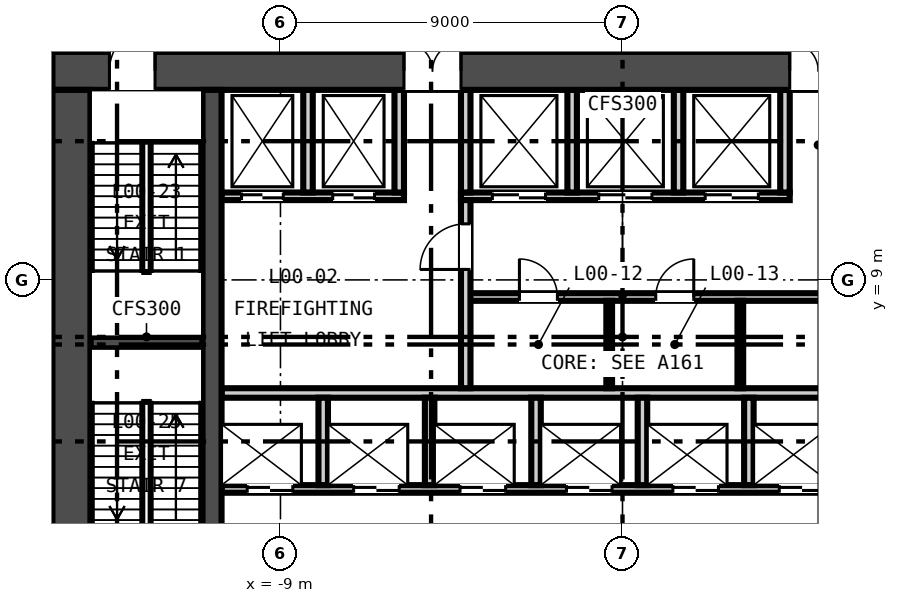
"""IFC4 building model, lengths in metres.
Left out: names, types, materials, properties, quantities, classifications, styles, units other than length and angle.
Written with IfcOpenShell. Run it as: python <this file> out.ifc"""

import sys

from ifc_helpers import new_model, si_unit, direction, frame, frame_2d, origin, place, context, subcontext, project, spatial, rectangle, extrude, element, fill, save


model = new_model("IFC4")
c1 = context("Model", 3, precision=1e-05, world=origin(), true_north=direction((0.0, 1.0)))
c2 = subcontext(c1, "Body", "Model", "MODEL_VIEW")
j1 = project(units=[si_unit("LENGTHUNIT", "METRE"), si_unit("PLANEANGLEUNIT", "RADIAN")], contexts=[c1])
p1 = place(None, origin())
s1 = spatial("IfcSite", under=j1, at=p1, CompositionType="ELEMENT")
p2 = place(p1, origin())
s2 = spatial("IfcBuilding", under=s1, at=p2, CompositionType="ELEMENT")
p3 = place(p2, origin())
s3 = spatial("IfcBuildingStorey", under=s2, at=p3, CompositionType="ELEMENT", Elevation=0.0)
p4 = place(p3, frame((-15.0, 14.5, -2.2), z_axis=(0.0, 0.0, 1.0), x_axis=(1.0, 0.0, 0.0)))
e1 = element("IfcWall", 1, at=p4, inside=s3, PredefinedType="SOLIDWALL", context=c2, shape_type="SweptSolid", body=[
    extrude(rectangle(XDim=30.0, YDim=1.0, at=frame_2d((15.0, 0.0))), origin(), (0.0, 0.0, 1.0), 10.8),
])
p5 = place(p4, frame((9.25, 0.0, 2.2)))
e2 = element("IfcOpeningElement", 2, at=p5, cuts=e1, PredefinedType="OPENING", context=c2, shape_type="SweptSolid", body=[
    extrude(rectangle(XDim=1.5, YDim=2.1, at=frame_2d((0.75, 1.05))), frame((0.0, 0.51, 0.0), z_axis=(0.0, -1.0, 0.0), x_axis=(1.0, 0.0, 0.0)), (0.0, 0.0, 1.0), 1.02),
])
p6 = place(p4, frame((19.4, 0.0, 2.2)))
e3 = element("IfcOpeningElement", 3, at=p6, cuts=e1, PredefinedType="OPENING", context=c2, shape_type="SweptSolid", body=[
    extrude(rectangle(XDim=1.5, YDim=2.1, at=frame_2d((0.75, 1.05))), frame((0.0, 0.51, 0.0), z_axis=(0.0, -1.0, 0.0), x_axis=(1.0, 0.0, 0.0)), (0.0, 0.0, 1.0), 1.02),
])
p7 = place(p4, frame((1.5, 0.0, 2.2)))
e4 = element("IfcOpeningElement", 4, at=p7, cuts=e1, PredefinedType="OPENING", context=c2, shape_type="SweptSolid", body=[
    extrude(rectangle(XDim=1.2, YDim=2.1, at=frame_2d((0.6, 1.05))), frame((0.0, 0.51, 0.0), z_axis=(0.0, -1.0, 0.0), x_axis=(1.0, 0.0, 0.0)), (0.0, 0.0, 1.0), 1.02),
])
p8 = place(p4, frame((27.3, 0.0, 2.2)))
e5 = element("IfcOpeningElement", 5, at=p8, cuts=e1, PredefinedType="OPENING", context=c2, shape_type="SweptSolid", body=[
    extrude(rectangle(XDim=1.2, YDim=2.1, at=frame_2d((0.6, 1.05))), frame((0.0, 0.51, 0.0), z_axis=(0.0, -1.0, 0.0), x_axis=(1.0, 0.0, 0.0)), (0.0, 0.0, 1.0), 1.02),
])
p9 = place(p3, frame((-14.5, 1.0, -2.2), z_axis=(0.0, 0.0, 1.0), x_axis=(0.0, 1.0, 0.0)))
e6 = element("IfcWall", 6, at=p9, inside=s3, PredefinedType="SOLIDWALL", context=c2, shape_type="SweptSolid", body=[
    extrude(rectangle(XDim=13.0, YDim=1.0, at=frame_2d((6.5, 0.0))), origin(), (0.0, 0.0, 1.0), 10.8),
])
p10 = place(p3, frame((-10.8, 1.0, -2.2), z_axis=(0.0, 0.0, 1.0), x_axis=(0.0, 1.0, 0.0)))
e7 = element("IfcWall", 7, at=p10, inside=s3, PredefinedType="SOLIDWALL", context=c2, shape_type="SweptSolid", body=[
    extrude(rectangle(XDim=13.0, YDim=0.5, at=frame_2d((6.5, 0.0))), origin(), (0.0, 0.0, 1.0), 10.8),
])
p11 = place(p3, frame((-10.55, 3.5, 0.0), z_axis=(0.0, 0.0, 1.0), x_axis=(1.0, 0.0, 0.0)))
e8 = element("IfcWall", 8, at=p11, inside=s3, PredefinedType="PARTITIONING", context=c2, shape_type="SweptSolid", body=[
    extrude(rectangle(XDim=21.1, YDim=0.2, at=frame_2d((10.55, 0.0))), origin(), (0.0, 0.0, 1.0), 8.6),
])
p12 = place(p11, frame((0.675, 0.0, 0.0)))
e9 = element("IfcOpeningElement", 9, at=p12, cuts=e8, PredefinedType="OPENING", context=c2, shape_type="SweptSolid", body=[
    extrude(rectangle(XDim=1.2, YDim=2.1, at=frame_2d((0.6, 1.05))), frame((0.0, 0.11, 0.0), z_axis=(0.0, -1.0, 0.0), x_axis=(1.0, 0.0, 0.0)), (0.0, 0.0, 1.0), 0.22),
])
p13 = place(p11, frame((3.475, 0.0, 0.0)))
e10 = element("IfcOpeningElement", 10, at=p13, cuts=e8, PredefinedType="OPENING", context=c2, shape_type="SweptSolid", body=[
    extrude(rectangle(XDim=1.2, YDim=2.1, at=frame_2d((0.6, 1.05))), frame((0.0, 0.11, 0.0), z_axis=(0.0, -1.0, 0.0), x_axis=(1.0, 0.0, 0.0)), (0.0, 0.0, 1.0), 0.22),
])
p14 = place(p11, frame((6.275, 0.0, 0.0)))
e11 = element("IfcOpeningElement", 11, at=p14, cuts=e8, PredefinedType="OPENING", context=c2, shape_type="SweptSolid", body=[
    extrude(rectangle(XDim=1.2, YDim=2.1, at=frame_2d((0.6, 1.05))), frame((0.0, 0.11, 0.0), z_axis=(0.0, -1.0, 0.0), x_axis=(1.0, 0.0, 0.0)), (0.0, 0.0, 1.0), 0.22),
])
p15 = place(p11, frame((9.075, 0.0, 0.0)))
e12 = element("IfcOpeningElement", 12, at=p15, cuts=e8, PredefinedType="OPENING", context=c2, shape_type="SweptSolid", body=[
    extrude(rectangle(XDim=1.2, YDim=2.1, at=frame_2d((0.6, 1.05))), frame((0.0, 0.11, 0.0), z_axis=(0.0, -1.0, 0.0), x_axis=(1.0, 0.0, 0.0)), (0.0, 0.0, 1.0), 0.22),
])
p16 = place(p11, frame((11.875, 0.0, 0.0)))
e13 = element("IfcOpeningElement", 13, at=p16, cuts=e8, PredefinedType="OPENING", context=c2, shape_type="SweptSolid", body=[
    extrude(rectangle(XDim=1.2, YDim=2.1, at=frame_2d((0.6, 1.05))), frame((0.0, 0.11, 0.0), z_axis=(0.0, -1.0, 0.0), x_axis=(1.0, 0.0, 0.0)), (0.0, 0.0, 1.0), 0.22),
])
p17 = place(p11, frame((14.675, 0.0, 0.0)))
e14 = element("IfcOpeningElement", 14, at=p17, cuts=e8, PredefinedType="OPENING", context=c2, shape_type="SweptSolid", body=[
    extrude(rectangle(XDim=1.2, YDim=2.1, at=frame_2d((0.6, 1.05))), frame((0.0, 0.11, 0.0), z_axis=(0.0, -1.0, 0.0), x_axis=(1.0, 0.0, 0.0)), (0.0, 0.0, 1.0), 0.22),
])
p18 = place(p11, frame((17.475, 0.0, 0.0)))
e15 = element("IfcOpeningElement", 15, at=p18, cuts=e8, PredefinedType="OPENING", context=c2, shape_type="SweptSolid", body=[
    extrude(rectangle(XDim=1.2, YDim=2.1, at=frame_2d((0.6, 1.05))), frame((0.0, 0.11, 0.0), z_axis=(0.0, -1.0, 0.0), x_axis=(1.0, 0.0, 0.0)), (0.0, 0.0, 1.0), 0.22),
])
p19 = place(p11, frame((19.9, 0.0, 0.0)))
e16 = element("IfcOpeningElement", 16, at=p19, cuts=e8, PredefinedType="OPENING", context=c2, shape_type="SweptSolid", body=[
    extrude(rectangle(XDim=0.9, YDim=2.1, at=frame_2d((0.45, 1.05))), frame((0.0, 0.11, 0.0), z_axis=(0.0, -1.0, 0.0), x_axis=(1.0, 0.0, 0.0)), (0.0, 0.0, 1.0), 0.22),
])
p20 = place(p3, frame((-10.55, 6.025, 0.0), z_axis=(0.0, 0.0, 1.0), x_axis=(1.0, 0.0, 0.0)))
e17 = element("IfcWall", 17, at=p20, inside=s3, PredefinedType="PARTITIONING", context=c2, shape_type="SweptSolid", body=[
    extrude(rectangle(XDim=21.1, YDim=0.25, at=frame_2d((10.55, 0.0))), origin(), (0.0, 0.0, 1.0), 8.6),
])
p21 = place(p3, frame((-4.125, 8.55, 0.0), z_axis=(0.0, 0.0, 1.0), x_axis=(1.0, 0.0, 0.0)))
e18 = element("IfcWall", 18, at=p21, inside=s3, PredefinedType="PARTITIONING", context=c2, shape_type="SweptSolid", body=[
    extrude(rectangle(XDim=14.675, YDim=0.2, at=frame_2d((7.337, 0.0))), origin(), (0.0, 0.0, 1.0), 8.6),
])
p22 = place(p21, frame((1.413, 0.0, 0.0)))
e19 = element("IfcOpeningElement", 19, at=p22, cuts=e18, PredefinedType="OPENING", context=c2, shape_type="SweptSolid", body=[
    extrude(rectangle(XDim=1.0, YDim=2.1, at=frame_2d((0.5, 1.05))), frame((0.0, 0.11, 0.0), z_axis=(0.0, -1.0, 0.0), x_axis=(1.0, 0.0, 0.0)), (0.0, 0.0, 1.0), 0.22),
])
p23 = place(p21, frame((5.0, 0.0, 0.0)))
e20 = element("IfcOpeningElement", 20, at=p23, cuts=e18, PredefinedType="OPENING", context=c2, shape_type="SweptSolid", body=[
    extrude(rectangle(XDim=1.0, YDim=2.1, at=frame_2d((0.5, 1.05))), frame((0.0, 0.11, 0.0), z_axis=(0.0, -1.0, 0.0), x_axis=(1.0, 0.0, 0.0)), (0.0, 0.0, 1.0), 0.22),
])
p24 = place(p21, frame((9.613, 0.0, 0.0)))
e21 = element("IfcOpeningElement", 21, at=p24, cuts=e18, PredefinedType="OPENING", context=c2, shape_type="SweptSolid", body=[
    extrude(rectangle(XDim=1.0, YDim=2.1, at=frame_2d((0.5, 1.05))), frame((0.0, 0.11, 0.0), z_axis=(0.0, -1.0, 0.0), x_axis=(1.0, 0.0, 0.0)), (0.0, 0.0, 1.0), 0.22),
])
p25 = place(p21, frame((13.475, 0.0, 0.0)))
e22 = element("IfcOpeningElement", 22, at=p25, cuts=e18, PredefinedType="OPENING", context=c2, shape_type="SweptSolid", body=[
    extrude(rectangle(XDim=0.9, YDim=2.1, at=frame_2d((0.45, 1.05))), frame((0.0, 0.11, 0.0), z_axis=(0.0, -1.0, 0.0), x_axis=(1.0, 0.0, 0.0)), (0.0, 0.0, 1.0), 0.22),
])
p26 = place(p3, frame((-10.55, 11.2, 0.0), z_axis=(0.0, 0.0, 1.0), x_axis=(1.0, 0.0, 0.0)))
e23 = element("IfcWall", 23, at=p26, inside=s3, PredefinedType="PARTITIONING", context=c2, shape_type="SweptSolid", body=[
    extrude(rectangle(XDim=4.8, YDim=0.2, at=frame_2d((2.4, 0.0))), origin(), (0.0, 0.0, 1.0), 8.6),
])
p27 = place(p26, frame((0.525, 0.0, 0.0)))
e24 = element("IfcOpeningElement", 24, at=p27, cuts=e23, PredefinedType="OPENING", context=c2, shape_type="SweptSolid", body=[
    extrude(rectangle(XDim=1.1, YDim=2.1, at=frame_2d((0.55, 1.05))), frame((0.0, 0.11, 0.0), z_axis=(0.0, -1.0, 0.0), x_axis=(1.0, 0.0, 0.0)), (0.0, 0.0, 1.0), 0.22),
])
p28 = place(p26, frame((2.925, 0.0, 0.0)))
e25 = element("IfcOpeningElement", 25, at=p28, cuts=e23, PredefinedType="OPENING", context=c2, shape_type="SweptSolid", body=[
    extrude(rectangle(XDim=1.1, YDim=2.1, at=frame_2d((0.55, 1.05))), frame((0.0, 0.11, 0.0), z_axis=(0.0, -1.0, 0.0), x_axis=(1.0, 0.0, 0.0)), (0.0, 0.0, 1.0), 0.22),
])
p29 = place(p3, frame((-4.25, 11.2, 0.0), z_axis=(0.0, 0.0, 1.0), x_axis=(1.0, 0.0, 0.0)))
e26 = element("IfcWall", 26, at=p29, inside=s3, PredefinedType="PARTITIONING", context=c2, shape_type="SweptSolid", body=[
    extrude(rectangle(XDim=8.65, YDim=0.2, at=frame_2d((4.325, 0.0))), origin(), (0.0, 0.0, 1.0), 8.6),
])
p30 = place(p29, frame((0.825, 0.0, 0.0)))
e27 = element("IfcOpeningElement", 27, at=p30, cuts=e26, PredefinedType="OPENING", context=c2, shape_type="SweptSolid", body=[
    extrude(rectangle(XDim=1.4, YDim=2.1, at=frame_2d((0.7, 1.05))), frame((0.0, 0.11, 0.0), z_axis=(0.0, -1.0, 0.0), x_axis=(1.0, 0.0, 0.0)), (0.0, 0.0, 1.0), 0.22),
])
p31 = place(p29, frame((3.625, 0.0, 0.0)))
e28 = element("IfcOpeningElement", 28, at=p31, cuts=e26, PredefinedType="OPENING", context=c2, shape_type="SweptSolid", body=[
    extrude(rectangle(XDim=1.4, YDim=2.1, at=frame_2d((0.7, 1.05))), frame((0.0, 0.11, 0.0), z_axis=(0.0, -1.0, 0.0), x_axis=(1.0, 0.0, 0.0)), (0.0, 0.0, 1.0), 0.22),
])
p32 = place(p29, frame((6.425, 0.0, 0.0)))
e29 = element("IfcOpeningElement", 29, at=p32, cuts=e26, PredefinedType="OPENING", context=c2, shape_type="SweptSolid", body=[
    extrude(rectangle(XDim=1.4, YDim=2.1, at=frame_2d((0.7, 1.05))), frame((0.0, 0.11, 0.0), z_axis=(0.0, -1.0, 0.0), x_axis=(1.0, 0.0, 0.0)), (0.0, 0.0, 1.0), 0.22),
])
p33 = place(p3, frame((-4.125, 6.15, 0.0), z_axis=(0.0, 0.0, 1.0), x_axis=(0.0, 1.0, 0.0)))
e30 = element("IfcWall", 30, at=p33, inside=s3, PredefinedType="PARTITIONING", context=c2, shape_type="SweptSolid", body=[
    extrude(rectangle(XDim=4.95, YDim=0.25, at=frame_2d((2.475, 0.0))), origin(), (0.0, 0.0, 1.0), 8.6),
])
p34 = place(p33, frame((3.125, 0.0, 0.0)))
e31 = element("IfcOpeningElement", 31, at=p34, cuts=e30, PredefinedType="OPENING", context=c2, shape_type="SweptSolid", body=[
    extrude(rectangle(XDim=1.2, YDim=2.1, at=frame_2d((0.6, 1.05))), frame((0.0, 0.135, 0.0), z_axis=(0.0, -1.0, 0.0), x_axis=(1.0, 0.0, 0.0)), (0.0, 0.0, 1.0), 0.27),
])
for number, where, z_axis, x_axis in (
    (32, (-7.875, 3.6, 0.0), (0.0, 0.0, 1.0), (0.0, 1.0, 0.0)),
    (33, (-5.075, 3.6, 0.0), (0.0, 0.0, 1.0), (0.0, 1.0, 0.0)),
    (34, (-2.275, 3.6, 0.0), (0.0, 0.0, 1.0), (0.0, 1.0, 0.0)),
    (35, (0.525, 3.6, 0.0), (0.0, 0.0, 1.0), (0.0, 1.0, 0.0)),
    (36, (3.325, 3.6, 0.0), (0.0, 0.0, 1.0), (0.0, 1.0, 0.0)),
):
    element("IfcWall", number, at=place(p3, frame(where, z_axis=z_axis, x_axis=x_axis)), inside=s3, PredefinedType="PARTITIONING", context=c2, shape_type="SweptSolid", body=[
        extrude(rectangle(XDim=2.3, YDim=0.25, at=frame_2d((1.15, 0.0))), origin(), (0.0, 0.0, 1.0), 8.6),
    ])
for number, where, z_axis, x_axis in (
    (37, (-0.35, 6.15, 0.0), (0.0, 0.0, 1.0), (0.0, 1.0, 0.0)),
    (38, (3.1, 6.15, 0.0), (0.0, 0.0, 1.0), (0.0, 1.0, 0.0)),
):
    element("IfcWall", number, at=place(p3, frame(where, z_axis=z_axis, x_axis=x_axis)), inside=s3, PredefinedType="PARTITIONING", context=c2, shape_type="SweptSolid", body=[
        extrude(rectangle(XDim=2.3, YDim=0.15, at=frame_2d((1.15, 0.0))), origin(), (0.0, 0.0, 1.0), 8.6),
    ])
for number, where, z_axis, x_axis in (
    (39, (-8.275, 11.3, 0.0), (0.0, 0.0, 1.0), (0.0, 1.0, 0.0)),
    (40, (-5.875, 11.3, 0.0), (0.0, 0.0, 1.0), (0.0, 1.0, 0.0)),
    (41, (-4.125, 11.3, 0.0), (0.0, 0.0, 1.0), (0.0, 1.0, 0.0)),
    (42, (-1.325, 11.3, 0.0), (0.0, 0.0, 1.0), (0.0, 1.0, 0.0)),
    (43, (1.475, 11.3, 0.0), (0.0, 0.0, 1.0), (0.0, 1.0, 0.0)),
    (44, (4.275, 11.3, 0.0), (0.0, 0.0, 1.0), (0.0, 1.0, 0.0)),
):
    element("IfcWall", number, at=place(p3, frame(where, z_axis=z_axis, x_axis=x_axis)), inside=s3, PredefinedType="PARTITIONING", context=c2, shape_type="SweptSolid", body=[
        extrude(rectangle(XDim=2.7, YDim=0.25, at=frame_2d((1.35, 0.0))), origin(), (0.0, 0.0, 1.0), 8.6),
    ])
p35 = place(p3, frame((-14.0, 7.35, 0.0), z_axis=(0.0, 0.0, 1.0), x_axis=(1.0, 0.0, 0.0)))
e45 = element("IfcWall", 45, at=p35, inside=s3, PredefinedType="SOLIDWALL", context=c2, shape_type="SweptSolid", body=[
    extrude(rectangle(XDim=2.95, YDim=0.3, at=frame_2d((1.475, 0.0))), origin(), (0.0, 0.0, 1.0), 8.6),
])
p36 = place(p34, origin())
e46 = element("IfcDoor", 46, at=p36, inside=s3, OperationType="SINGLE_SWING_LEFT", PredefinedType="DOOR", context=c2, shape_type="SweptSolid", body=[
    extrude(rectangle(XDim=1.2, YDim=2.1, at=frame_2d((0.6, 1.05))), frame((0.0, 0.025, 0.0), z_axis=(0.0, -1.0, 0.0), x_axis=(1.0, 0.0, 0.0)), (0.0, 0.0, 1.0), 0.05),
])
fill(e31, e46)
p37 = place(p12, origin())
e47 = element("IfcDoor", 47, at=p37, inside=s3, OperationType="DOUBLE_DOOR_SLIDING", PredefinedType="DOOR", context=c2, shape_type="SweptSolid", body=[
    extrude(rectangle(XDim=1.2, YDim=2.1, at=frame_2d((0.6, 1.05))), frame((0.0, 0.025, 0.0), z_axis=(0.0, -1.0, 0.0), x_axis=(1.0, 0.0, 0.0)), (0.0, 0.0, 1.0), 0.05),
])
fill(e9, e47)
p38 = place(p13, origin())
e48 = element("IfcDoor", 48, at=p38, inside=s3, OperationType="DOUBLE_DOOR_SLIDING", PredefinedType="DOOR", context=c2, shape_type="SweptSolid", body=[
    extrude(rectangle(XDim=1.2, YDim=2.1, at=frame_2d((0.6, 1.05))), frame((0.0, 0.025, 0.0), z_axis=(0.0, -1.0, 0.0), x_axis=(1.0, 0.0, 0.0)), (0.0, 0.0, 1.0), 0.05),
])
fill(e10, e48)
p39 = place(p14, origin())
e49 = element("IfcDoor", 49, at=p39, inside=s3, OperationType="DOUBLE_DOOR_SLIDING", PredefinedType="DOOR", context=c2, shape_type="SweptSolid", body=[
    extrude(rectangle(XDim=1.2, YDim=2.1, at=frame_2d((0.6, 1.05))), frame((0.0, 0.025, 0.0), z_axis=(0.0, -1.0, 0.0), x_axis=(1.0, 0.0, 0.0)), (0.0, 0.0, 1.0), 0.05),
])
fill(e11, e49)
p40 = place(p15, origin())
e50 = element("IfcDoor", 50, at=p40, inside=s3, OperationType="DOUBLE_DOOR_SLIDING", PredefinedType="DOOR", context=c2, shape_type="SweptSolid", body=[
    extrude(rectangle(XDim=1.2, YDim=2.1, at=frame_2d((0.6, 1.05))), frame((0.0, 0.025, 0.0), z_axis=(0.0, -1.0, 0.0), x_axis=(1.0, 0.0, 0.0)), (0.0, 0.0, 1.0), 0.05),
])
fill(e12, e50)
p41 = place(p16, origin())
e51 = element("IfcDoor", 51, at=p41, inside=s3, OperationType="DOUBLE_DOOR_SLIDING", PredefinedType="DOOR", context=c2, shape_type="SweptSolid", body=[
    extrude(rectangle(XDim=1.2, YDim=2.1, at=frame_2d((0.6, 1.05))), frame((0.0, 0.025, 0.0), z_axis=(0.0, -1.0, 0.0), x_axis=(1.0, 0.0, 0.0)), (0.0, 0.0, 1.0), 0.05),
])
fill(e13, e51)
p42 = place(p17, origin())
e52 = element("IfcDoor", 52, at=p42, inside=s3, OperationType="DOUBLE_DOOR_SLIDING", PredefinedType="DOOR", context=c2, shape_type="SweptSolid", body=[
    extrude(rectangle(XDim=1.2, YDim=2.1, at=frame_2d((0.6, 1.05))), frame((0.0, 0.025, 0.0), z_axis=(0.0, -1.0, 0.0), x_axis=(1.0, 0.0, 0.0)), (0.0, 0.0, 1.0), 0.05),
])
fill(e14, e52)
p43 = place(p22, origin())
e53 = element("IfcDoor", 53, at=p43, inside=s3, OperationType="SINGLE_SWING_LEFT", PredefinedType="DOOR", context=c2, shape_type="SweptSolid", body=[
    extrude(rectangle(XDim=1.0, YDim=2.1, at=frame_2d((0.5, 1.05))), frame((0.0, 0.025, 0.0), z_axis=(0.0, -1.0, 0.0), x_axis=(1.0, 0.0, 0.0)), (0.0, 0.0, 1.0), 0.05),
])
fill(e19, e53)
p44 = place(p23, origin())
e54 = element("IfcDoor", 54, at=p44, inside=s3, OperationType="SINGLE_SWING_RIGHT", PredefinedType="DOOR", context=c2, shape_type="SweptSolid", body=[
    extrude(rectangle(XDim=1.0, YDim=2.1, at=frame_2d((0.5, 1.05))), frame((0.0, 0.025, 0.0), z_axis=(0.0, -1.0, 0.0), x_axis=(1.0, 0.0, 0.0)), (0.0, 0.0, 1.0), 0.05),
])
fill(e20, e54)
p45 = place(p27, origin())
e55 = element("IfcDoor", 55, at=p45, inside=s3, OperationType="DOUBLE_DOOR_SLIDING", PredefinedType="DOOR", context=c2, shape_type="SweptSolid", body=[
    extrude(rectangle(XDim=1.1, YDim=2.1, at=frame_2d((0.55, 1.05))), frame((0.0, 0.025, 0.0), z_axis=(0.0, -1.0, 0.0), x_axis=(1.0, 0.0, 0.0)), (0.0, 0.0, 1.0), 0.05),
])
fill(e24, e55)
p46 = place(p28, origin())
e56 = element("IfcDoor", 56, at=p46, inside=s3, OperationType="DOUBLE_DOOR_SLIDING", PredefinedType="DOOR", context=c2, shape_type="SweptSolid", body=[
    extrude(rectangle(XDim=1.1, YDim=2.1, at=frame_2d((0.55, 1.05))), frame((0.0, 0.025, 0.0), z_axis=(0.0, -1.0, 0.0), x_axis=(1.0, 0.0, 0.0)), (0.0, 0.0, 1.0), 0.05),
])
fill(e25, e56)
p47 = place(p30, origin())
e57 = element("IfcDoor", 57, at=p47, inside=s3, OperationType="DOUBLE_DOOR_SLIDING", PredefinedType="DOOR", context=c2, shape_type="SweptSolid", body=[
    extrude(rectangle(XDim=1.4, YDim=2.1, at=frame_2d((0.7, 1.05))), frame((0.0, 0.025, 0.0), z_axis=(0.0, -1.0, 0.0), x_axis=(1.0, 0.0, 0.0)), (0.0, 0.0, 1.0), 0.05),
])
fill(e27, e57)
p48 = place(p31, origin())
e58 = element("IfcDoor", 58, at=p48, inside=s3, OperationType="DOUBLE_DOOR_SLIDING", PredefinedType="DOOR", context=c2, shape_type="SweptSolid", body=[
    extrude(rectangle(XDim=1.4, YDim=2.1, at=frame_2d((0.7, 1.05))), frame((0.0, 0.025, 0.0), z_axis=(0.0, -1.0, 0.0), x_axis=(1.0, 0.0, 0.0)), (0.0, 0.0, 1.0), 0.05),
])
fill(e28, e58)
p49 = place(p32, origin())
e59 = element("IfcDoor", 59, at=p49, inside=s3, OperationType="DOUBLE_DOOR_SLIDING", PredefinedType="DOOR", context=c2, shape_type="SweptSolid", body=[
    extrude(rectangle(XDim=1.4, YDim=2.1, at=frame_2d((0.7, 1.05))), frame((0.0, 0.025, 0.0), z_axis=(0.0, -1.0, 0.0), x_axis=(1.0, 0.0, 0.0)), (0.0, 0.0, 1.0), 0.05),
])
fill(e29, e59)
p50 = place(p5, origin())
e60 = element("IfcDoor", 60, at=p50, inside=s3, OperationType="DOUBLE_DOOR_SINGLE_SWING", PredefinedType="DOOR", context=c2, shape_type="SweptSolid", body=[
    extrude(rectangle(XDim=1.5, YDim=2.1, at=frame_2d((0.75, 1.05))), frame((0.0, 0.025, 0.0), z_axis=(0.0, -1.0, 0.0), x_axis=(1.0, 0.0, 0.0)), (0.0, 0.0, 1.0), 0.05),
])
fill(e2, e60)
p51 = place(p6, origin())
e61 = element("IfcDoor", 61, at=p51, inside=s3, OperationType="DOUBLE_DOOR_SINGLE_SWING", PredefinedType="DOOR", context=c2, shape_type="SweptSolid", body=[
    extrude(rectangle(XDim=1.5, YDim=2.1, at=frame_2d((0.75, 1.05))), frame((0.0, 0.025, 0.0), z_axis=(0.0, -1.0, 0.0), x_axis=(1.0, 0.0, 0.0)), (0.0, 0.0, 1.0), 0.05),
])
fill(e3, e61)
p52 = place(p7, origin())
e62 = element("IfcDoor", 62, at=p52, inside=s3, OperationType="SINGLE_SWING_RIGHT", PredefinedType="DOOR", context=c2, shape_type="SweptSolid", body=[
    extrude(rectangle(XDim=1.2, YDim=2.1, at=frame_2d((0.6, 1.05))), frame((0.0, 0.025, 0.0), z_axis=(0.0, -1.0, 0.0), x_axis=(1.0, 0.0, 0.0)), (0.0, 0.0, 1.0), 0.05),
])
fill(e4, e62)
save(model, sys.argv[1])
